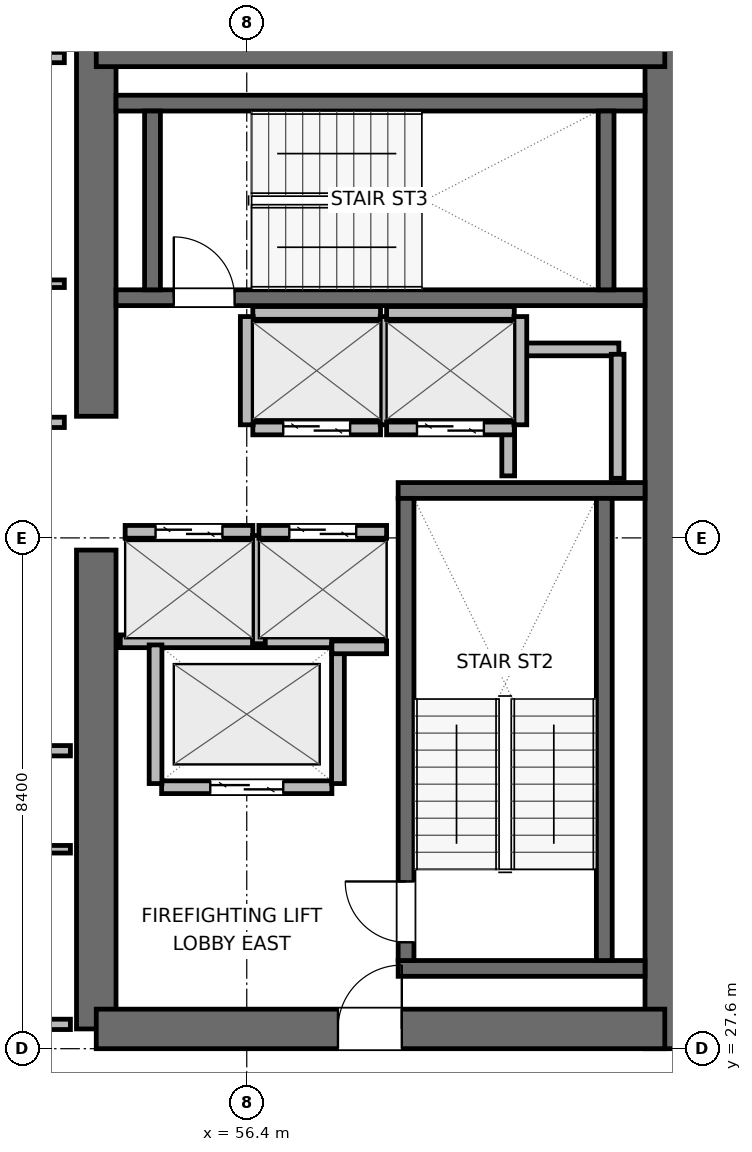
"""IFC4 building model, lengths in metres.
Left out: names, types, materials, properties, quantities, classifications, styles, units other than length and angle.
Written with IfcOpenShell. Run it as: python <this file> out.ifc"""

import sys

from ifc_helpers import new_model, si_unit, direction, frame, frame_2d, origin, place, context, subcontext, project, spatial, rectangle, extrude, element, fill, save


model = new_model("IFC4")
c1 = context("Model", 3, precision=1e-05, world=origin(), true_north=direction((0.0, 1.0)))
c2 = subcontext(c1, "Body", "Model", "MODEL_VIEW")
j1 = project(units=[si_unit("LENGTHUNIT", "METRE"), si_unit("PLANEANGLEUNIT", "RADIAN")], contexts=[c1])
p1 = place(None, origin())
s1 = spatial("IfcSite", under=j1, at=p1, CompositionType="ELEMENT")
p2 = place(p1, origin())
s2 = spatial("IfcBuilding", under=s1, at=p2, CompositionType="ELEMENT")
p3 = place(p2, frame((0.0, 0.0, 223.2)))
s3 = spatial("IfcBuildingStorey", under=s2, at=p3, CompositionType="ELEMENT", Elevation=223.2)
p4 = place(p3, frame((53.925, 27.925, 0.0), z_axis=(0.0, 0.0, 1.0), x_axis=(0.0, 1.0, 0.0)))
e1 = element("IfcWall", 1, at=p4, inside=s3, PredefinedType="SHEAR", context=c2, shape_type="SweptSolid", body=[
    extrude(rectangle(XDim=7.875, YDim=0.65, at=frame_2d((3.938, 0.0))), origin(), (0.0, 0.0, 1.0), 3.9),
])
p5 = place(p3, frame((53.925, 38.0, 0.0), z_axis=(0.0, 0.0, 1.0), x_axis=(0.0, 1.0, 0.0)))
e2 = element("IfcWall", 2, at=p5, inside=s3, PredefinedType="SHEAR", context=c2, shape_type="SweptSolid", body=[
    extrude(rectangle(XDim=6.075, YDim=0.65, at=frame_2d((3.038, 0.0))), origin(), (0.0, 0.0, 1.0), 3.9),
])
p6 = place(p3, frame((63.275, 27.6, 0.0), z_axis=(0.0, 0.0, 1.0), x_axis=(0.0, 1.0, 0.0)))
e3 = element("IfcWall", 3, at=p6, inside=s3, PredefinedType="SHEAR", context=c2, shape_type="SweptSolid", body=[
    extrude(rectangle(XDim=16.8, YDim=0.65, at=frame_2d((8.4, 0.0))), origin(), (0.0, 0.0, 1.0), 3.9),
])
p7 = place(p3, frame((53.925, 27.925, 0.0), z_axis=(0.0, 0.0, 1.0), x_axis=(1.0, 0.0, 0.0)))
e4 = element("IfcWall", 4, at=p7, inside=s3, PredefinedType="SHEAR", context=c2, shape_type="SweptSolid", body=[
    extrude(rectangle(XDim=9.35, YDim=0.65, at=frame_2d((4.675, 0.0))), origin(), (0.0, 0.0, 1.0), 3.9),
])
p8 = place(p7, frame((3.975, 0.0, 0.0)))
e5 = element("IfcOpeningElement", 5, at=p8, cuts=e4, PredefinedType="OPENING", context=c2, shape_type="SweptSolid", body=[
    extrude(rectangle(XDim=1.05, YDim=2.04, at=frame_2d((0.525, 1.02))), frame((0.0, 0.335, 0.0), z_axis=(0.0, -1.0, 0.0), x_axis=(1.0, 0.0, 0.0)), (0.0, 0.0, 1.0), 0.67),
])
p9 = place(p3, frame((53.925, 44.075, 0.0), z_axis=(0.0, 0.0, 1.0), x_axis=(1.0, 0.0, 0.0)))
e6 = element("IfcWall", 6, at=p9, inside=s3, PredefinedType="SHEAR", context=c2, shape_type="SweptSolid", body=[
    extrude(rectangle(XDim=9.35, YDim=0.65, at=frame_2d((4.675, 0.0))), origin(), (0.0, 0.0, 1.0), 3.9),
])
for number, where, z_axis, x_axis in (
    (7, (58.89, 28.92, 0.0), (0.0, 0.0, 1.0), (1.0, 0.0, 0.0)),
    (8, (58.89, 36.78, 0.0), (0.0, 0.0, 1.0), (1.0, 0.0, 0.0)),
):
    element("IfcWall", number, at=place(p3, frame(where, z_axis=z_axis, x_axis=x_axis)), inside=s3, PredefinedType="SHEAR", context=c2, shape_type="SweptSolid", body=[
        extrude(rectangle(XDim=4.06, YDim=0.26, at=frame_2d((2.03, 0.0))), origin(), (0.0, 0.0, 1.0), 3.9),
    ])
p10 = place(p3, frame((59.02, 29.05, 0.0), z_axis=(0.0, 0.0, 1.0), x_axis=(0.0, 1.0, 0.0)))
e9 = element("IfcWall", 9, at=p10, inside=s3, PredefinedType="SHEAR", context=c2, shape_type="SweptSolid", body=[
    extrude(rectangle(XDim=7.6, YDim=0.26, at=frame_2d((3.8, 0.0))), origin(), (0.0, 0.0, 1.0), 3.9),
])
p11 = place(p10, frame((0.3, 0.0, 0.0)))
e10 = element("IfcOpeningElement", 10, at=p11, cuts=e9, PredefinedType="OPENING", context=c2, shape_type="SweptSolid", body=[
    extrude(rectangle(XDim=1.0, YDim=2.04, at=frame_2d((0.5, 1.02))), frame((0.0, 0.14, 0.0), z_axis=(0.0, -1.0, 0.0), x_axis=(1.0, 0.0, 0.0)), (0.0, 0.0, 1.0), 0.28),
])
p12 = place(p3, frame((62.28, 29.05, 0.0), z_axis=(0.0, 0.0, 1.0), x_axis=(0.0, 1.0, 0.0)))
e11 = element("IfcWall", 11, at=p12, inside=s3, PredefinedType="SHEAR", context=c2, shape_type="SweptSolid", body=[
    extrude(rectangle(XDim=7.6, YDim=0.26, at=frame_2d((3.8, 0.0))), origin(), (0.0, 0.0, 1.0), 3.9),
])
p13 = place(p3, frame((54.25, 39.95, 0.0), z_axis=(0.0, 0.0, 1.0), x_axis=(1.0, 0.0, 0.0)))
e12 = element("IfcWall", 12, at=p13, inside=s3, PredefinedType="SHEAR", context=c2, shape_type="SweptSolid", body=[
    extrude(rectangle(XDim=8.7, YDim=0.26, at=frame_2d((4.35, 0.0))), origin(), (0.0, 0.0, 1.0), 3.9),
])
p14 = place(p13, frame((0.95, 0.0, 0.0)))
e13 = element("IfcOpeningElement", 13, at=p14, cuts=e12, PredefinedType="OPENING", context=c2, shape_type="SweptSolid", body=[
    extrude(rectangle(XDim=1.0, YDim=2.04, at=frame_2d((0.5, 1.02))), frame((0.0, 0.14, 0.0), z_axis=(0.0, -1.0, 0.0), x_axis=(1.0, 0.0, 0.0)), (0.0, 0.0, 1.0), 0.28),
])
p15 = place(p3, frame((54.25, 43.15, 0.0), z_axis=(0.0, 0.0, 1.0), x_axis=(1.0, 0.0, 0.0)))
e14 = element("IfcWall", 14, at=p15, inside=s3, PredefinedType="SHEAR", context=c2, shape_type="SweptSolid", body=[
    extrude(rectangle(XDim=8.7, YDim=0.26, at=frame_2d((4.35, 0.0))), origin(), (0.0, 0.0, 1.0), 3.9),
])
for number, where, z_axis, x_axis in (
    (15, (54.85, 40.08, 0.0), (0.0, 0.0, 1.0), (0.0, 1.0, 0.0)),
    (16, (62.31, 40.08, 0.0), (0.0, 0.0, 1.0), (0.0, 1.0, 0.0)),
):
    element("IfcWall", number, at=place(p3, frame(where, z_axis=z_axis, x_axis=x_axis)), inside=s3, PredefinedType="SHEAR", context=c2, shape_type="SweptSolid", body=[
        extrude(rectangle(XDim=2.94, YDim=0.26, at=frame_2d((1.47, 0.0))), origin(), (0.0, 0.0, 1.0), 3.9),
    ])
p16 = place(p3, frame((60.72, 39.1, 0.0), z_axis=(0.0, 0.0, 1.0), x_axis=(1.0, 0.0, 0.0)))
e17 = element("IfcWall", 17, at=p16, inside=s3, PredefinedType="PARTITIONING", context=c2, shape_type="SweptSolid", body=[
    extrude(rectangle(XDim=1.8, YDim=0.21, at=frame_2d((0.9, 0.0))), origin(), (0.0, 0.0, 1.0), 3.68),
])
p17 = place(p3, frame((60.7, 37.02, 0.0), z_axis=(0.0, 0.0, 1.0), x_axis=(0.0, 1.0, 0.0)))
e18 = element("IfcWall", 18, at=p17, inside=s3, PredefinedType="PARTITIONING", context=c2, shape_type="SweptSolid", body=[
    extrude(rectangle(XDim=1.96, YDim=0.21, at=frame_2d((0.98, 0.0))), origin(), (0.0, 0.0, 1.0), 3.68),
])
p18 = place(p3, frame((62.5, 36.98, 0.0), z_axis=(0.0, 0.0, 1.0), x_axis=(0.0, 1.0, 0.0)))
e19 = element("IfcWall", 19, at=p18, inside=s3, PredefinedType="PARTITIONING", context=c2, shape_type="SweptSolid", body=[
    extrude(rectangle(XDim=2.04, YDim=0.21, at=frame_2d((1.02, 0.0))), origin(), (0.0, 0.0, 1.0), 3.68),
])
p19 = place(p3, frame((55.0, 31.9, 0.0), z_axis=(0.0, 0.0, 1.0), x_axis=(1.0, 0.0, 0.0)))
e20 = element("IfcWall", 20, at=p19, inside=s3, PredefinedType="PARTITIONING", context=c2, shape_type="SweptSolid", body=[
    extrude(rectangle(XDim=2.8, YDim=0.21, at=frame_2d((1.4, 0.0))), origin(), (0.0, 0.0, 1.0), 3.68),
])
p20 = place(p19, frame((0.8, 0.0, 0.0)))
e21 = element("IfcOpeningElement", 21, at=p20, cuts=e20, PredefinedType="OPENING", context=c2, shape_type="SweptSolid", body=[
    extrude(rectangle(XDim=1.2, YDim=2.04, at=frame_2d((0.6, 1.02))), frame((0.0, 0.115, 0.0), z_axis=(0.0, -1.0, 0.0), x_axis=(1.0, 0.0, 0.0)), (0.0, 0.0, 1.0), 0.23),
])
p21 = place(p3, frame((54.32, 34.3, 0.0), z_axis=(0.0, 0.0, 1.0), x_axis=(1.0, 0.0, 0.0)))
e22 = element("IfcWall", 22, at=p21, inside=s3, PredefinedType="PARTITIONING", context=c2, shape_type="SweptSolid", body=[
    extrude(rectangle(XDim=3.48, YDim=0.21, at=frame_2d((1.74, 0.0))), origin(), (0.0, 0.0, 1.0), 3.68),
])
for number, where, z_axis, x_axis in (
    (23, (54.9, 31.96, 0.0), (0.0, 0.0, 1.0), (0.0, 1.0, 0.0)),
    (24, (57.9, 31.96, 0.0), (0.0, 0.0, 1.0), (0.0, 1.0, 0.0)),
):
    element("IfcWall", number, at=place(p3, frame(where, z_axis=z_axis, x_axis=x_axis)), inside=s3, PredefinedType="PARTITIONING", context=c2, shape_type="SweptSolid", body=[
        extrude(rectangle(XDim=2.28, YDim=0.21, at=frame_2d((1.14, 0.0))), origin(), (0.0, 0.0, 1.0), 3.68),
    ])
p22 = place(p3, frame((54.4, 36.1, 0.0), z_axis=(0.0, 0.0, 1.0), x_axis=(1.0, 0.0, 0.0)))
e25 = element("IfcWall", 25, at=p22, inside=s3, PredefinedType="PARTITIONING", context=c2, shape_type="SweptSolid", body=[
    extrude(rectangle(XDim=2.1, YDim=0.21, at=frame_2d((1.05, 0.0))), origin(), (0.0, 0.0, 1.0), 3.68),
])
p23 = place(p22, frame((0.5, 0.0, 0.0)))
e26 = element("IfcOpeningElement", 26, at=p23, cuts=e25, PredefinedType="OPENING", context=c2, shape_type="SweptSolid", body=[
    extrude(rectangle(XDim=1.1, YDim=2.04, at=frame_2d((0.55, 1.02))), frame((0.0, 0.115, 0.0), z_axis=(0.0, -1.0, 0.0), x_axis=(1.0, 0.0, 0.0)), (0.0, 0.0, 1.0), 0.23),
])
p24 = place(p3, frame((56.6, 34.26, 0.0), z_axis=(0.0, 0.0, 1.0), x_axis=(0.0, 1.0, 0.0)))
e27 = element("IfcWall", 27, at=p24, inside=s3, PredefinedType="PARTITIONING", context=c2, shape_type="SweptSolid", body=[
    extrude(rectangle(XDim=1.78, YDim=0.21, at=frame_2d((0.89, 0.0))), origin(), (0.0, 0.0, 1.0), 3.68),
])
p25 = place(p3, frame((56.6, 36.1, 0.0), z_axis=(0.0, 0.0, 1.0), x_axis=(1.0, 0.0, 0.0)))
e28 = element("IfcWall", 28, at=p25, inside=s3, PredefinedType="PARTITIONING", context=c2, shape_type="SweptSolid", body=[
    extrude(rectangle(XDim=2.1, YDim=0.21, at=frame_2d((1.05, 0.0))), origin(), (0.0, 0.0, 1.0), 3.68),
])
p26 = place(p25, frame((0.5, 0.0, 0.0)))
e29 = element("IfcOpeningElement", 29, at=p26, cuts=e28, PredefinedType="OPENING", context=c2, shape_type="SweptSolid", body=[
    extrude(rectangle(XDim=1.1, YDim=2.04, at=frame_2d((0.55, 1.02))), frame((0.0, 0.115, 0.0), z_axis=(0.0, -1.0, 0.0), x_axis=(1.0, 0.0, 0.0)), (0.0, 0.0, 1.0), 0.23),
])
p27 = place(p3, frame((57.8, 34.2, 0.0), z_axis=(0.0, 0.0, 1.0), x_axis=(1.0, 0.0, 0.0)))
e30 = element("IfcWall", 30, at=p27, inside=s3, PredefinedType="PARTITIONING", context=c2, shape_type="SweptSolid", body=[
    extrude(rectangle(XDim=0.9, YDim=0.21, at=frame_2d((0.45, 0.0))), origin(), (0.0, 0.0, 1.0), 3.68),
])
p28 = place(p3, frame((56.5, 37.8, 0.0), z_axis=(0.0, 0.0, 1.0), x_axis=(1.0, 0.0, 0.0)))
e31 = element("IfcWall", 31, at=p28, inside=s3, PredefinedType="PARTITIONING", context=c2, shape_type="SweptSolid", body=[
    extrude(rectangle(XDim=2.1, YDim=0.21, at=frame_2d((1.05, 0.0))), origin(), (0.0, 0.0, 1.0), 3.68),
])
p29 = place(p28, frame((0.5, 0.0, 0.0)))
e32 = element("IfcOpeningElement", 32, at=p29, cuts=e31, PredefinedType="OPENING", context=c2, shape_type="SweptSolid", body=[
    extrude(rectangle(XDim=1.1, YDim=2.04, at=frame_2d((0.55, 1.02))), frame((0.0, 0.115, 0.0), z_axis=(0.0, -1.0, 0.0), x_axis=(1.0, 0.0, 0.0)), (0.0, 0.0, 1.0), 0.23),
])
p30 = place(p3, frame((56.5, 39.7, 0.0), z_axis=(0.0, 0.0, 1.0), x_axis=(1.0, 0.0, 0.0)))
e33 = element("IfcWall", 33, at=p30, inside=s3, PredefinedType="PARTITIONING", context=c2, shape_type="SweptSolid", body=[
    extrude(rectangle(XDim=2.1, YDim=0.21, at=frame_2d((1.05, 0.0))), origin(), (0.0, 0.0, 1.0), 3.68),
])
for number, where, z_axis, x_axis in (
    (34, (56.4, 37.86, 0.0), (0.0, 0.0, 1.0), (0.0, 1.0, 0.0)),
    (35, (58.7, 37.86, 0.0), (0.0, 0.0, 1.0), (0.0, 1.0, 0.0)),
):
    element("IfcWall", number, at=place(p3, frame(where, z_axis=z_axis, x_axis=x_axis)), inside=s3, PredefinedType="PARTITIONING", context=c2, shape_type="SweptSolid", body=[
        extrude(rectangle(XDim=1.78, YDim=0.21, at=frame_2d((0.89, 0.0))), origin(), (0.0, 0.0, 1.0), 3.68),
    ])
p31 = place(p3, frame((58.7, 37.8, 0.0), z_axis=(0.0, 0.0, 1.0), x_axis=(1.0, 0.0, 0.0)))
e36 = element("IfcWall", 36, at=p31, inside=s3, PredefinedType="PARTITIONING", context=c2, shape_type="SweptSolid", body=[
    extrude(rectangle(XDim=2.1, YDim=0.21, at=frame_2d((1.05, 0.0))), origin(), (0.0, 0.0, 1.0), 3.68),
])
p32 = place(p31, frame((0.5, 0.0, 0.0)))
e37 = element("IfcOpeningElement", 37, at=p32, cuts=e36, PredefinedType="OPENING", context=c2, shape_type="SweptSolid", body=[
    extrude(rectangle(XDim=1.1, YDim=2.04, at=frame_2d((0.55, 1.02))), frame((0.0, 0.115, 0.0), z_axis=(0.0, -1.0, 0.0), x_axis=(1.0, 0.0, 0.0)), (0.0, 0.0, 1.0), 0.23),
])
p33 = place(p3, frame((58.7, 39.7, 0.0), z_axis=(0.0, 0.0, 1.0), x_axis=(1.0, 0.0, 0.0)))
e38 = element("IfcWall", 38, at=p33, inside=s3, PredefinedType="PARTITIONING", context=c2, shape_type="SweptSolid", body=[
    extrude(rectangle(XDim=2.1, YDim=0.21, at=frame_2d((1.05, 0.0))), origin(), (0.0, 0.0, 1.0), 3.68),
])
p34 = place(p3, frame((60.9, 37.86, 0.0), z_axis=(0.0, 0.0, 1.0), x_axis=(0.0, 1.0, 0.0)))
e39 = element("IfcWall", 39, at=p34, inside=s3, PredefinedType="PARTITIONING", context=c2, shape_type="SweptSolid", body=[
    extrude(rectangle(XDim=1.78, YDim=0.21, at=frame_2d((0.89, 0.0))), origin(), (0.0, 0.0, 1.0), 3.68),
])
p35 = place(p3, frame((49.287, 28.0, 0.0), z_axis=(0.0, 0.0, 1.0), x_axis=(1.0, 0.0, 0.0)))
e40 = element("IfcWall", 40, at=p35, inside=s3, PredefinedType="PARTITIONING", context=c2, shape_type="SweptSolid", body=[
    extrude(rectangle(XDim=4.213, YDim=0.17, at=frame_2d((2.106, 0.0))), origin(), (0.0, 0.0, 1.0), 2.765),
])
p36 = place(p3, frame((52.2, 32.5, 0.0), z_axis=(0.0, 0.0, 1.0), x_axis=(1.0, 0.0, 0.0)))
e41 = element("IfcWall", 41, at=p36, inside=s3, PredefinedType="PARTITIONING", context=c2, shape_type="SweptSolid", body=[
    extrude(rectangle(XDim=1.3, YDim=0.17, at=frame_2d((0.65, 0.0))), origin(), (0.0, 0.0, 1.0), 3.68),
])
p37 = place(p3, frame((49.287, 30.88, 0.0), z_axis=(0.0, 0.0, 1.0), x_axis=(1.0, 0.0, 0.0)))
e42 = element("IfcWall", 42, at=p37, inside=s3, PredefinedType="PARTITIONING", context=c2, shape_type="SweptSolid", body=[
    extrude(rectangle(XDim=4.213, YDim=0.125, at=frame_2d((2.106, 0.0))), origin(), (0.0, 0.0, 1.0), 3.68),
])
p38 = place(p3, frame((49.287, 37.9, 0.0), z_axis=(0.0, 0.0, 1.0), x_axis=(1.0, 0.0, 0.0)))
e43 = element("IfcWall", 43, at=p38, inside=s3, PredefinedType="PARTITIONING", context=c2, shape_type="SweptSolid", body=[
    extrude(rectangle(XDim=4.113, YDim=0.17, at=frame_2d((2.056, 0.0))), origin(), (0.0, 0.0, 1.0), 3.68),
])
p39 = place(p3, frame((49.287, 43.9, 0.0), z_axis=(0.0, 0.0, 1.0), x_axis=(1.0, 0.0, 0.0)))
e44 = element("IfcWall", 44, at=p39, inside=s3, PredefinedType="PARTITIONING", context=c2, shape_type="SweptSolid", body=[
    extrude(rectangle(XDim=4.113, YDim=0.17, at=frame_2d((2.056, 0.0))), origin(), (0.0, 0.0, 1.0), 2.765),
])
p40 = place(p3, frame((49.287, 40.18, 0.0), z_axis=(0.0, 0.0, 1.0), x_axis=(1.0, 0.0, 0.0)))
e45 = element("IfcWall", 45, at=p40, inside=s3, PredefinedType="PARTITIONING", context=c2, shape_type="SweptSolid", body=[
    extrude(rectangle(XDim=4.113, YDim=0.125, at=frame_2d((2.056, 0.0))), origin(), (0.0, 0.0, 1.0), 3.68),
])
p41 = place(p11, origin())
e46 = element("IfcDoor", 46, at=p41, inside=s3, OperationType="SINGLE_SWING_RIGHT", PredefinedType="DOOR", context=c2, shape_type="SweptSolid", body=[
    extrude(rectangle(XDim=1.0, YDim=2.04, at=frame_2d((0.5, 1.02))), frame((0.0, 0.025, 0.0), z_axis=(0.0, -1.0, 0.0), x_axis=(1.0, 0.0, 0.0)), (0.0, 0.0, 1.0), 0.05),
])
fill(e10, e46)
p42 = place(p14, origin())
e47 = element("IfcDoor", 47, at=p42, inside=s3, OperationType="SINGLE_SWING_LEFT", PredefinedType="DOOR", context=c2, shape_type="SweptSolid", body=[
    extrude(rectangle(XDim=1.0, YDim=2.04, at=frame_2d((0.5, 1.02))), frame((0.0, 0.025, 0.0), z_axis=(0.0, -1.0, 0.0), x_axis=(1.0, 0.0, 0.0)), (0.0, 0.0, 1.0), 0.05),
])
fill(e13, e47)
p43 = place(p20, origin())
e48 = element("IfcDoor", 48, at=p43, inside=s3, OperationType="DOUBLE_DOOR_SLIDING", PredefinedType="DOOR", context=c2, shape_type="SweptSolid", body=[
    extrude(rectangle(XDim=1.2, YDim=2.04, at=frame_2d((0.6, 1.02))), frame((0.0, 0.025, 0.0), z_axis=(0.0, -1.0, 0.0), x_axis=(1.0, 0.0, 0.0)), (0.0, 0.0, 1.0), 0.05),
])
fill(e21, e48)
p44 = place(p23, origin())
e49 = element("IfcDoor", 49, at=p44, inside=s3, OperationType="DOUBLE_DOOR_SLIDING", PredefinedType="DOOR", context=c2, shape_type="SweptSolid", body=[
    extrude(rectangle(XDim=1.1, YDim=2.04, at=frame_2d((0.55, 1.02))), frame((0.0, 0.025, 0.0), z_axis=(0.0, -1.0, 0.0), x_axis=(1.0, 0.0, 0.0)), (0.0, 0.0, 1.0), 0.05),
])
fill(e26, e49)
p45 = place(p26, origin())
e50 = element("IfcDoor", 50, at=p45, inside=s3, OperationType="DOUBLE_DOOR_SLIDING", PredefinedType="DOOR", context=c2, shape_type="SweptSolid", body=[
    extrude(rectangle(XDim=1.1, YDim=2.04, at=frame_2d((0.55, 1.02))), frame((0.0, 0.025, 0.0), z_axis=(0.0, -1.0, 0.0), x_axis=(1.0, 0.0, 0.0)), (0.0, 0.0, 1.0), 0.05),
])
fill(e29, e50)
p46 = place(p29, origin())
e51 = element("IfcDoor", 51, at=p46, inside=s3, OperationType="DOUBLE_DOOR_SLIDING", PredefinedType="DOOR", context=c2, shape_type="SweptSolid", body=[
    extrude(rectangle(XDim=1.1, YDim=2.04, at=frame_2d((0.55, 1.02))), frame((0.0, 0.025, 0.0), z_axis=(0.0, -1.0, 0.0), x_axis=(1.0, 0.0, 0.0)), (0.0, 0.0, 1.0), 0.05),
])
fill(e32, e51)
p47 = place(p32, origin())
e52 = element("IfcDoor", 52, at=p47, inside=s3, OperationType="DOUBLE_DOOR_SLIDING", PredefinedType="DOOR", context=c2, shape_type="SweptSolid", body=[
    extrude(rectangle(XDim=1.1, YDim=2.04, at=frame_2d((0.55, 1.02))), frame((0.0, 0.025, 0.0), z_axis=(0.0, -1.0, 0.0), x_axis=(1.0, 0.0, 0.0)), (0.0, 0.0, 1.0), 0.05),
])
fill(e37, e52)
p48 = place(p8, origin())
e53 = element("IfcDoor", 53, at=p48, inside=s3, OperationType="SINGLE_SWING_RIGHT", PredefinedType="DOOR", context=c2, shape_type="SweptSolid", body=[
    extrude(rectangle(XDim=1.05, YDim=2.04, at=frame_2d((0.525, 1.02))), frame((0.0, 0.025, 0.0), z_axis=(0.0, -1.0, 0.0), x_axis=(1.0, 0.0, 0.0)), (0.0, 0.0, 1.0), 0.05),
])
fill(e5, e53)
save(model, sys.argv[1])
